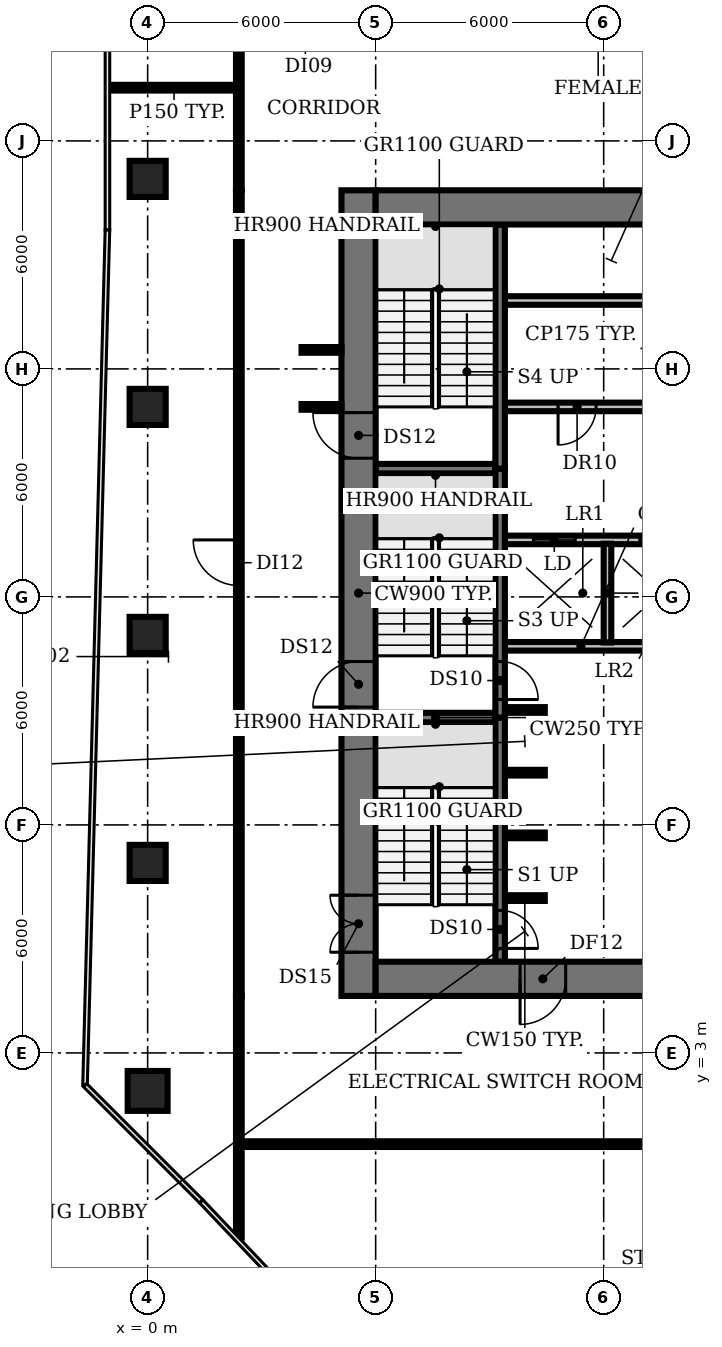
"""IFC4 building model, lengths in metres.
Left out: names, types, materials, properties, quantities, classifications, styles, units other than length and angle.
Written with IfcOpenShell. Run it as: python <this file> out.ifc"""

import sys

from ifc_helpers import new_model, si_unit, direction, frame, frame_2d, origin, origin_2d, place, context, subcontext, project, spatial, rectangle, circle, extrude, element, fill, save


model = new_model("IFC4")
c1 = context("Model", 3, precision=1e-05, world=origin(), true_north=direction((0.0, 1.0)))
c2 = subcontext(c1, "Body", "Model", "MODEL_VIEW")
j1 = project(units=[si_unit("LENGTHUNIT", "METRE"), si_unit("PLANEANGLEUNIT", "RADIAN")], contexts=[c1])
p1 = place(None, origin())
s1 = spatial("IfcSite", under=j1, at=p1, CompositionType="ELEMENT")
p2 = place(p1, origin())
s2 = spatial("IfcBuilding", under=s1, at=p2, CompositionType="ELEMENT")
p3 = place(p2, frame((0.0, 0.0, 45.8)))
s3 = spatial("IfcBuildingStorey", under=s2, at=p3, CompositionType="ELEMENT", Elevation=45.8)
p4 = place(p3, frame((0.0, 2.0, 0.0), z_axis=(0.0, 0.0, 1.0), x_axis=(1.0, 0.0, 0.0)))
e1 = element("IfcColumn", 1, at=p4, inside=s3, PredefinedType="COLUMN", context=c2, shape_type="SweptSolid", body=[
    extrude(circle(Radius=0.525, at=origin_2d()), origin(), (0.0, 0.0, 1.0), 3.85),
])
for number, where, z_axis, x_axis in (
    (2, (0.0, 8.0, 0.0), (0.0, 0.0, 1.0), (1.0, 0.0, 0.0)),
    (3, (0.0, 14.0, 0.0), (0.0, 0.0, 1.0), (1.0, 0.0, 0.0)),
    (4, (0.0, 20.0, 0.0), (0.0, 0.0, 1.0), (1.0, 0.0, 0.0)),
    (5, (0.0, 26.0, 0.0), (0.0, 0.0, 1.0), (1.0, 0.0, 0.0)),
):
    element("IfcColumn", number, at=place(p3, frame(where, z_axis=z_axis, x_axis=x_axis)), inside=s3, PredefinedType="COLUMN", context=c2, shape_type="SweptSolid", body=[
        extrude(rectangle(XDim=0.95, YDim=0.95, at=origin_2d()), origin(), (0.0, 0.0, 1.0), 3.85),
    ])
for number, where, z_axis, x_axis in (
    (6, (9.4, 7.075, 0.0), (0.0, 0.0, 1.0), (1.0, 0.0, 0.0)),
    (7, (9.4, 8.725, 0.0), (0.0, 0.0, 1.0), (1.0, 0.0, 0.0)),
    (8, (9.4, 10.375, 0.0), (0.0, 0.0, 1.0), (1.0, 0.0, 0.0)),
):
    element("IfcWall", number, at=place(p3, frame(where, z_axis=z_axis, x_axis=x_axis)), inside=s3, PredefinedType="SHEAR", context=c2, shape_type="SweptSolid", body=[
        extrude(rectangle(XDim=1.05, YDim=0.15, at=frame_2d((0.525, 0.0))), origin(), (0.0, 0.0, 1.0), 3.85),
    ])
p5 = place(p3, frame((6.0, 11.825, 0.0), z_axis=(0.0, 0.0, 1.0), x_axis=(1.0, 0.0, 0.0)))
e9 = element("IfcWall", 9, at=p5, inside=s3, PredefinedType="SHEAR", context=c2, shape_type="SweptSolid", body=[
    extrude(rectangle(XDim=3.15, YDim=0.25, at=frame_2d((1.575, 0.0))), origin(), (0.0, 0.0, 1.0), 3.85),
])
p6 = place(p3, frame((9.4, 12.025, 0.0), z_axis=(0.0, 0.0, 1.0), x_axis=(1.0, 0.0, 0.0)))
e10 = element("IfcWall", 10, at=p6, inside=s3, PredefinedType="SHEAR", context=c2, shape_type="SweptSolid", body=[
    extrude(rectangle(XDim=1.05, YDim=0.15, at=frame_2d((0.525, 0.0))), origin(), (0.0, 0.0, 1.0), 3.85),
])
p7 = place(p3, frame((9.4, 13.7, 0.0), z_axis=(0.0, 0.0, 1.0), x_axis=(1.0, 0.0, 0.0)))
e11 = element("IfcWall", 11, at=p7, inside=s3, PredefinedType="PARTITIONING", context=c2, shape_type="SweptSolid", body=[
    extrude(rectangle(XDim=4.0, YDim=0.225, at=frame_2d((2.0, 0.0))), origin(), (0.0, 0.0, 1.0), 3.85),
])
p8 = place(p3, frame((9.4, 16.5, 0.0), z_axis=(0.0, 0.0, 1.0), x_axis=(1.0, 0.0, 0.0)))
e12 = element("IfcWall", 12, at=p8, inside=s3, PredefinedType="PARTITIONING", context=c2, shape_type="SweptSolid", body=[
    extrude(rectangle(XDim=14.6, YDim=0.225, at=frame_2d((7.3, 0.0))), origin(), (0.0, 0.0, 1.0), 3.85),
])
p9 = place(p8, frame((0.75, 0.0, 0.0)))
e13 = element("IfcOpeningElement", 13, at=p9, cuts=e12, PredefinedType="OPENING", context=c2, shape_type="SweptSolid", body=[
    extrude(rectangle(XDim=1.1, YDim=2.1, at=frame_2d((0.55, 1.05))), frame((0.0, 0.123, 0.0), z_axis=(0.0, -1.0, 0.0), x_axis=(1.0, 0.0, 0.0)), (0.0, 0.0, 1.0), 0.245),
])
p10 = place(p8, frame((3.55, 0.0, 0.0)))
e14 = element("IfcOpeningElement", 14, at=p10, cuts=e12, PredefinedType="OPENING", context=c2, shape_type="SweptSolid", body=[
    extrude(rectangle(XDim=1.1, YDim=2.1, at=frame_2d((0.55, 1.05))), frame((0.0, 0.123, 0.0), z_axis=(0.0, -1.0, 0.0), x_axis=(1.0, 0.0, 0.0)), (0.0, 0.0, 1.0), 0.245),
])
p11 = place(p8, frame((6.35, 0.0, 0.0)))
e15 = element("IfcOpeningElement", 15, at=p11, cuts=e12, PredefinedType="OPENING", context=c2, shape_type="SweptSolid", body=[
    extrude(rectangle(XDim=1.1, YDim=2.1, at=frame_2d((0.55, 1.05))), frame((0.0, 0.123, 0.0), z_axis=(0.0, -1.0, 0.0), x_axis=(1.0, 0.0, 0.0)), (0.0, 0.0, 1.0), 0.245),
])
p12 = place(p8, frame((9.15, 0.0, 0.0)))
e16 = element("IfcOpeningElement", 16, at=p12, cuts=e12, PredefinedType="OPENING", context=c2, shape_type="SweptSolid", body=[
    extrude(rectangle(XDim=1.1, YDim=2.1, at=frame_2d((0.55, 1.05))), frame((0.0, 0.123, 0.0), z_axis=(0.0, -1.0, 0.0), x_axis=(1.0, 0.0, 0.0)), (0.0, 0.0, 1.0), 0.245),
])
p13 = place(p8, frame((12.4, 0.0, 0.0)))
e17 = element("IfcOpeningElement", 17, at=p13, cuts=e12, PredefinedType="OPENING", context=c2, shape_type="SweptSolid", body=[
    extrude(rectangle(XDim=1.0, YDim=2.1, at=frame_2d((0.5, 1.05))), frame((0.0, 0.123, 0.0), z_axis=(0.0, -1.0, 0.0), x_axis=(1.0, 0.0, 0.0)), (0.0, 0.0, 1.0), 0.245),
])
p14 = place(p3, frame((6.0, 18.375, 0.0), z_axis=(0.0, 0.0, 1.0), x_axis=(1.0, 0.0, 0.0)))
e18 = element("IfcWall", 18, at=p14, inside=s3, PredefinedType="SHEAR", context=c2, shape_type="SweptSolid", body=[
    extrude(rectangle(XDim=3.15, YDim=0.25, at=frame_2d((1.575, 0.0))), origin(), (0.0, 0.0, 1.0), 3.85),
])
p15 = place(p3, frame((24.0, 20.0, 0.0), z_axis=(0.0, 0.0, 1.0), x_axis=(-1.0, 0.0, 0.0)))
e19 = element("IfcWall", 19, at=p15, inside=s3, PredefinedType="PARTITIONING", context=c2, shape_type="SweptSolid", body=[
    extrude(rectangle(XDim=14.6, YDim=0.225, at=frame_2d((7.3, 0.0))), origin(), (0.0, 0.0, 1.0), 3.85),
])
p16 = place(p15, frame((12.2, 0.0, 0.0)))
e20 = element("IfcOpeningElement", 20, at=p16, cuts=e19, PredefinedType="OPENING", context=c2, shape_type="SweptSolid", body=[
    extrude(rectangle(XDim=1.0, YDim=2.1, at=frame_2d((0.5, 1.05))), frame((0.0, 0.123, 0.0), z_axis=(0.0, -1.0, 0.0), x_axis=(1.0, 0.0, 0.0)), (0.0, 0.0, 1.0), 0.245),
])
p17 = place(p15, frame((9.025, 0.0, 0.0)))
e21 = element("IfcOpeningElement", 21, at=p17, cuts=e19, PredefinedType="OPENING", context=c2, shape_type="SweptSolid", body=[
    extrude(rectangle(XDim=0.9, YDim=2.1, at=frame_2d((0.45, 1.05))), frame((0.0, 0.123, 0.0), z_axis=(0.0, -1.0, 0.0), x_axis=(1.0, 0.0, 0.0)), (0.0, 0.0, 1.0), 0.245),
])
p18 = place(p15, frame((5.375, 0.0, 0.0)))
e22 = element("IfcOpeningElement", 22, at=p18, cuts=e19, PredefinedType="OPENING", context=c2, shape_type="SweptSolid", body=[
    extrude(rectangle(XDim=1.0, YDim=2.1, at=frame_2d((0.5, 1.05))), frame((0.0, 0.123, 0.0), z_axis=(0.0, -1.0, 0.0), x_axis=(1.0, 0.0, 0.0)), (0.0, 0.0, 1.0), 0.245),
])
p19 = place(p15, frame((1.2, 0.0, 0.0)))
e23 = element("IfcOpeningElement", 23, at=p19, cuts=e19, PredefinedType="OPENING", context=c2, shape_type="SweptSolid", body=[
    extrude(rectangle(XDim=1.0, YDim=2.1, at=frame_2d((0.5, 1.05))), frame((0.0, 0.123, 0.0), z_axis=(0.0, -1.0, 0.0), x_axis=(1.0, 0.0, 0.0)), (0.0, 0.0, 1.0), 0.245),
])
p20 = place(p3, frame((9.4, 22.8, 0.0), z_axis=(0.0, 0.0, 1.0), x_axis=(1.0, 0.0, 0.0)))
e24 = element("IfcWall", 24, at=p20, inside=s3, PredefinedType="PARTITIONING", context=c2, shape_type="SweptSolid", body=[
    extrude(rectangle(XDim=14.6, YDim=0.225, at=frame_2d((7.3, 0.0))), origin(), (0.0, 0.0, 1.0), 3.85),
])
p21 = place(p3, frame((9.275, 11.825, 0.0), z_axis=(0.0, 0.0, 1.0), x_axis=(0.0, -1.0, 0.0)))
e25 = element("IfcWall", 25, at=p21, inside=s3, PredefinedType="SHEAR", context=c2, shape_type="SweptSolid", body=[
    extrude(rectangle(XDim=6.425, YDim=0.25, at=frame_2d((3.212, 0.0))), origin(), (0.0, 0.0, 1.0), 3.85),
])
p22 = place(p21, frame((5.075, 0.0, 0.0)))
e26 = element("IfcOpeningElement", 26, at=p22, cuts=e25, PredefinedType="OPENING", context=c2, shape_type="SweptSolid", body=[
    extrude(rectangle(XDim=1.0, YDim=2.1, at=frame_2d((0.5, 1.05))), frame((0.0, 0.135, 0.0), z_axis=(0.0, -1.0, 0.0), x_axis=(1.0, 0.0, 0.0)), (0.0, 0.0, 1.0), 0.27),
])
p23 = place(p3, frame((9.275, 18.375, 0.0), z_axis=(0.0, 0.0, 1.0), x_axis=(0.0, -1.0, 0.0)))
e27 = element("IfcWall", 27, at=p23, inside=s3, PredefinedType="SHEAR", context=c2, shape_type="SweptSolid", body=[
    extrude(rectangle(XDim=6.55, YDim=0.25, at=frame_2d((3.275, 0.0))), origin(), (0.0, 0.0, 1.0), 3.85),
])
p24 = place(p23, frame((5.075, 0.0, 0.0)))
e28 = element("IfcOpeningElement", 28, at=p24, cuts=e27, PredefinedType="OPENING", context=c2, shape_type="SweptSolid", body=[
    extrude(rectangle(XDim=1.0, YDim=2.1, at=frame_2d((0.5, 1.05))), frame((0.0, 0.135, 0.0), z_axis=(0.0, -1.0, 0.0), x_axis=(1.0, 0.0, 0.0)), (0.0, 0.0, 1.0), 0.27),
])
p25 = place(p3, frame((9.275, 18.375, 0.0), z_axis=(0.0, 0.0, 1.0), x_axis=(0.0, 1.0, 0.0)))
e29 = element("IfcWall", 29, at=p25, inside=s3, PredefinedType="SHEAR", context=c2, shape_type="SweptSolid", body=[
    extrude(rectangle(XDim=6.425, YDim=0.25, at=frame_2d((3.212, 0.0))), origin(), (0.0, 0.0, 1.0), 3.85),
])
p26 = place(p3, frame((12.1, 13.8, 0.0), z_axis=(0.0, 0.0, 1.0), x_axis=(0.0, 1.0, 0.0)))
e30 = element("IfcWall", 30, at=p26, inside=s3, PredefinedType="SOLIDWALL", context=c2, shape_type="SweptSolid", body=[
    extrude(rectangle(XDim=2.6, YDim=0.2, at=frame_2d((1.3, 0.0))), origin(), (0.0, 0.0, 1.0), 3.85),
])
p27 = place(p3, frame((5.55, 4.5, 0.0), z_axis=(0.0, 0.0, 1.0), x_axis=(0.0, 1.0, 0.0)))
e31 = element("IfcWall", 31, at=p27, inside=s3, PredefinedType="SHEAR", context=c2, shape_type="SweptSolid", body=[
    extrude(rectangle(XDim=21.2, YDim=0.9, at=frame_2d((10.6, 0.0))), origin(), (0.0, 0.0, 1.0), 3.85),
])
p28 = place(p27, frame((1.15, 0.0, 0.0)))
e32 = element("IfcOpeningElement", 32, at=p28, cuts=e31, PredefinedType="OPENING", context=c2, shape_type="SweptSolid", body=[
    extrude(rectangle(XDim=1.5, YDim=2.1, at=frame_2d((0.75, 1.05))), frame((0.0, 0.46, 0.0), z_axis=(0.0, -1.0, 0.0), x_axis=(1.0, 0.0, 0.0)), (0.0, 0.0, 1.0), 0.92),
])
p29 = place(p27, frame((7.6, 0.0, 0.0)))
e33 = element("IfcOpeningElement", 33, at=p29, cuts=e31, PredefinedType="OPENING", context=c2, shape_type="SweptSolid", body=[
    extrude(rectangle(XDim=1.2, YDim=2.1, at=frame_2d((0.6, 1.05))), frame((0.0, 0.46, 0.0), z_axis=(0.0, -1.0, 0.0), x_axis=(1.0, 0.0, 0.0)), (0.0, 0.0, 1.0), 0.92),
])
p30 = place(p27, frame((14.15, 0.0, 0.0)))
e34 = element("IfcOpeningElement", 34, at=p30, cuts=e31, PredefinedType="OPENING", context=c2, shape_type="SweptSolid", body=[
    extrude(rectangle(XDim=1.2, YDim=2.1, at=frame_2d((0.6, 1.05))), frame((0.0, 0.46, 0.0), z_axis=(0.0, -1.0, 0.0), x_axis=(1.0, 0.0, 0.0)), (0.0, 0.0, 1.0), 0.92),
])
p31 = place(p3, frame((24.0, 4.95, 0.0), z_axis=(0.0, 0.0, 1.0), x_axis=(-1.0, 0.0, 0.0)))
e35 = element("IfcWall", 35, at=p31, inside=s3, PredefinedType="SHEAR", context=c2, shape_type="SweptSolid", body=[
    extrude(rectangle(XDim=18.0, YDim=0.9, at=frame_2d((9.0, 0.0))), origin(), (0.0, 0.0, 1.0), 3.85),
])
p32 = place(p31, frame((13.0, 0.0, 0.0)))
e36 = element("IfcOpeningElement", 36, at=p32, cuts=e35, PredefinedType="OPENING", context=c2, shape_type="SweptSolid", body=[
    extrude(rectangle(XDim=1.2, YDim=2.1, at=frame_2d((0.6, 1.05))), frame((0.0, 0.46, 0.0), z_axis=(0.0, -1.0, 0.0), x_axis=(1.0, 0.0, 0.0)), (0.0, 0.0, 1.0), 0.92),
])
p33 = place(p31, frame((4.9, 0.0, 0.0)))
e37 = element("IfcOpeningElement", 37, at=p33, cuts=e35, PredefinedType="OPENING", context=c2, shape_type="SweptSolid", body=[
    extrude(rectangle(XDim=1.0, YDim=2.1, at=frame_2d((0.5, 1.05))), frame((0.0, 0.46, 0.0), z_axis=(0.0, -1.0, 0.0), x_axis=(1.0, 0.0, 0.0)), (0.0, 0.0, 1.0), 0.92),
])
p34 = place(p3, frame((6.0, 25.25, 0.0), z_axis=(0.0, 0.0, 1.0), x_axis=(1.0, 0.0, 0.0)))
e38 = element("IfcWall", 38, at=p34, inside=s3, PredefinedType="SHEAR", context=c2, shape_type="SweptSolid", body=[
    extrude(rectangle(XDim=18.0, YDim=0.9, at=frame_2d((9.0, 0.0))), origin(), (0.0, 0.0, 1.0), 3.85),
])
p35 = place(p3, frame((-1.01, 28.4, 0.0), z_axis=(0.0, 0.0, 1.0), x_axis=(1.0, 0.0, 0.0)))
e39 = element("IfcWall", 39, at=p35, inside=s3, PredefinedType="PARTITIONING", context=c2, shape_type="SweptSolid", body=[
    extrude(rectangle(XDim=3.41, YDim=0.15, at=frame_2d((1.705, 0.0))), origin(), (0.0, 0.0, 1.0), 2.83),
])
p36 = place(p3, frame((2.4, -1.862, 0.0), z_axis=(0.0, 0.0, 1.0), x_axis=(0.0, 1.0, 0.0)))
e40 = element("IfcWall", 40, at=p36, inside=s3, PredefinedType="PARTITIONING", context=c2, shape_type="SweptSolid", body=[
    extrude(rectangle(XDim=2.462, YDim=0.15, at=frame_2d((1.231, 0.0))), origin(), (0.0, 0.0, 1.0), 2.83),
])
p37 = place(p3, frame((2.4, 0.6, 0.0), z_axis=(0.0, 0.0, 1.0), x_axis=(0.0, 1.0, 0.0)))
e41 = element("IfcWall", 41, at=p37, inside=s3, PredefinedType="PARTITIONING", context=c2, shape_type="SweptSolid", body=[
    extrude(rectangle(XDim=3.9, YDim=0.15, at=frame_2d((1.95, 0.0))), origin(), (0.0, 0.0, 1.0), 2.83),
])
p38 = place(p3, frame((2.4, 4.5, 0.0), z_axis=(0.0, 0.0, 1.0), x_axis=(0.0, 1.0, 0.0)))
e42 = element("IfcWall", 42, at=p38, inside=s3, PredefinedType="PARTITIONING", context=c2, shape_type="SweptSolid", body=[
    extrude(rectangle(XDim=21.2, YDim=0.15, at=frame_2d((10.6, 0.0))), origin(), (0.0, 0.0, 1.0), 2.83),
])
p39 = place(p38, frame((10.8, 0.0, 0.0)))
e43 = element("IfcOpeningElement", 43, at=p39, cuts=e42, PredefinedType="OPENING", context=c2, shape_type="SweptSolid", body=[
    extrude(rectangle(XDim=1.2, YDim=2.1, at=frame_2d((0.6, 1.05))), frame((0.0, 0.085, 0.0), z_axis=(0.0, -1.0, 0.0), x_axis=(1.0, 0.0, 0.0)), (0.0, 0.0, 1.0), 0.17),
])
p40 = place(p3, frame((2.4, 25.7, 0.0), z_axis=(0.0, 0.0, 1.0), x_axis=(0.0, 1.0, 0.0)))
e44 = element("IfcWall", 44, at=p40, inside=s3, PredefinedType="PARTITIONING", context=c2, shape_type="SweptSolid", body=[
    extrude(rectangle(XDim=3.9, YDim=0.15, at=frame_2d((1.95, 0.0))), origin(), (0.0, 0.0, 1.0), 2.83),
])
for number, where, z_axis, x_axis in (
    (45, (4.05, 20.0, 0.0), (0.0, 0.0, 1.0), (1.0, 0.0, 0.0)),
    (46, (4.05, 21.5, 0.0), (0.0, 0.0, 1.0), (1.0, 0.0, 0.0)),
):
    element("IfcWall", number, at=place(p3, frame(where, z_axis=z_axis, x_axis=x_axis)), inside=s3, PredefinedType="PARTITIONING", context=c2, shape_type="SweptSolid", body=[
        extrude(rectangle(XDim=1.05, YDim=0.15, at=frame_2d((0.525, 0.0))), origin(), (0.0, 0.0, 1.0), 2.83),
    ])
p41 = place(p3, frame((27.6, 0.6, 0.0), z_axis=(0.0, 0.0, 1.0), x_axis=(-1.0, 0.0, 0.0)))
e47 = element("IfcWall", 47, at=p41, inside=s3, PredefinedType="PARTITIONING", context=c2, shape_type="SweptSolid", body=[
    extrude(rectangle(XDim=25.2, YDim=0.15, at=frame_2d((12.6, 0.0))), origin(), (0.0, 0.0, 1.0), 2.83),
])
p42 = place(p41, frame((12.1, 0.0, 0.0)))
e48 = element("IfcOpeningElement", 48, at=p42, cuts=e47, PredefinedType="OPENING", context=c2, shape_type="SweptSolid", body=[
    extrude(rectangle(XDim=1.2, YDim=2.1, at=frame_2d((0.6, 1.05))), frame((0.0, 0.085, 0.0), z_axis=(0.0, -1.0, 0.0), x_axis=(1.0, 0.0, 0.0)), (0.0, 0.0, 1.0), 0.17),
])
p43 = place(p9, origin())
e49 = element("IfcDoor", 49, at=p43, inside=s3, OperationType="DOUBLE_DOOR_SLIDING", PredefinedType="DOOR", context=c2, shape_type="SweptSolid", body=[
    extrude(rectangle(XDim=1.1, YDim=2.1, at=frame_2d((0.55, 1.05))), frame((0.0, 0.025, 0.0), z_axis=(0.0, -1.0, 0.0), x_axis=(1.0, 0.0, 0.0)), (0.0, 0.0, 1.0), 0.05),
])
fill(e13, e49)
p44 = place(p10, origin())
e50 = element("IfcDoor", 50, at=p44, inside=s3, OperationType="DOUBLE_DOOR_SLIDING", PredefinedType="DOOR", context=c2, shape_type="SweptSolid", body=[
    extrude(rectangle(XDim=1.1, YDim=2.1, at=frame_2d((0.55, 1.05))), frame((0.0, 0.025, 0.0), z_axis=(0.0, -1.0, 0.0), x_axis=(1.0, 0.0, 0.0)), (0.0, 0.0, 1.0), 0.05),
])
fill(e14, e50)
p45 = place(p16, origin())
e51 = element("IfcDoor", 51, at=p45, inside=s3, OperationType="SINGLE_SWING_RIGHT", PredefinedType="DOOR", context=c2, shape_type="SweptSolid", body=[
    extrude(rectangle(XDim=1.0, YDim=2.1, at=frame_2d((0.5, 1.05))), frame((0.0, 0.025, 0.0), z_axis=(0.0, -1.0, 0.0), x_axis=(1.0, 0.0, 0.0)), (0.0, 0.0, 1.0), 0.05),
])
fill(e20, e51)
p46 = place(p22, origin())
e52 = element("IfcDoor", 52, at=p46, inside=s3, OperationType="SINGLE_SWING_RIGHT", PredefinedType="DOOR", context=c2, shape_type="SweptSolid", body=[
    extrude(rectangle(XDim=1.0, YDim=2.1, at=frame_2d((0.5, 1.05))), frame((0.0, 0.025, 0.0), z_axis=(0.0, -1.0, 0.0), x_axis=(1.0, 0.0, 0.0)), (0.0, 0.0, 1.0), 0.05),
])
fill(e26, e52)
p47 = place(p24, origin())
e53 = element("IfcDoor", 53, at=p47, inside=s3, OperationType="SINGLE_SWING_RIGHT", PredefinedType="DOOR", context=c2, shape_type="SweptSolid", body=[
    extrude(rectangle(XDim=1.0, YDim=2.1, at=frame_2d((0.5, 1.05))), frame((0.0, 0.025, 0.0), z_axis=(0.0, -1.0, 0.0), x_axis=(1.0, 0.0, 0.0)), (0.0, 0.0, 1.0), 0.05),
])
fill(e28, e53)
p48 = place(p28, origin())
e54 = element("IfcDoor", 54, at=p48, inside=s3, OperationType="DOUBLE_DOOR_SINGLE_SWING", PredefinedType="DOOR", context=c2, shape_type="SweptSolid", body=[
    extrude(rectangle(XDim=1.5, YDim=2.1, at=frame_2d((0.75, 1.05))), frame((0.0, 0.025, 0.0), z_axis=(0.0, -1.0, 0.0), x_axis=(1.0, 0.0, 0.0)), (0.0, 0.0, 1.0), 0.05),
])
fill(e32, e54)
p49 = place(p29, origin())
e55 = element("IfcDoor", 55, at=p49, inside=s3, OperationType="SINGLE_SWING_LEFT", PredefinedType="DOOR", context=c2, shape_type="SweptSolid", body=[
    extrude(rectangle(XDim=1.2, YDim=2.1, at=frame_2d((0.6, 1.05))), frame((0.0, 0.025, 0.0), z_axis=(0.0, -1.0, 0.0), x_axis=(1.0, 0.0, 0.0)), (0.0, 0.0, 1.0), 0.05),
])
fill(e33, e55)
p50 = place(p30, origin())
e56 = element("IfcDoor", 56, at=p50, inside=s3, OperationType="SINGLE_SWING_RIGHT", PredefinedType="DOOR", context=c2, shape_type="SweptSolid", body=[
    extrude(rectangle(XDim=1.2, YDim=2.1, at=frame_2d((0.6, 1.05))), frame((0.0, 0.025, 0.0), z_axis=(0.0, -1.0, 0.0), x_axis=(1.0, 0.0, 0.0)), (0.0, 0.0, 1.0), 0.05),
])
fill(e34, e56)
p51 = place(p32, origin())
e57 = element("IfcDoor", 57, at=p51, inside=s3, OperationType="SINGLE_SWING_RIGHT", PredefinedType="DOOR", context=c2, shape_type="SweptSolid", body=[
    extrude(rectangle(XDim=1.2, YDim=2.1, at=frame_2d((0.6, 1.05))), frame((0.0, 0.025, 0.0), z_axis=(0.0, -1.0, 0.0), x_axis=(1.0, 0.0, 0.0)), (0.0, 0.0, 1.0), 0.05),
])
fill(e36, e57)
p52 = place(p39, origin())
e58 = element("IfcDoor", 58, at=p52, inside=s3, OperationType="SINGLE_SWING_RIGHT", PredefinedType="DOOR", context=c2, shape_type="SweptSolid", body=[
    extrude(rectangle(XDim=1.2, YDim=2.1, at=frame_2d((0.6, 1.05))), frame((0.0, 0.025, 0.0), z_axis=(0.0, -1.0, 0.0), x_axis=(1.0, 0.0, 0.0)), (0.0, 0.0, 1.0), 0.05),
])
fill(e43, e58)
save(model, sys.argv[1])
